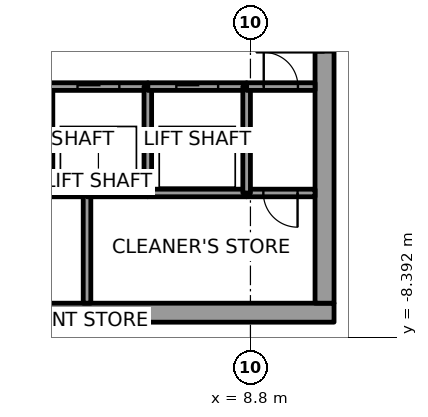
"""IFC4 building model, lengths in metres.
Left out: names, types, materials, properties, quantities, classifications, styles, units other than length and angle.
Written with IfcOpenShell. Run it as: python <this file> out.ifc"""

import sys

from ifc_helpers import new_model, si_unit, direction, frame, frame_2d, origin, place, context, subcontext, project, spatial, rectangle, extrude, element, fill, save


model = new_model("IFC4")
c1 = context("Model", 3, precision=1e-05, world=origin(), true_north=direction((0.0, 1.0)))
c2 = subcontext(c1, "Body", "Model", "MODEL_VIEW")
j1 = project(units=[si_unit("LENGTHUNIT", "METRE"), si_unit("PLANEANGLEUNIT", "RADIAN")], contexts=[c1])
p1 = place(None, origin())
s1 = spatial("IfcSite", under=j1, at=p1, CompositionType="ELEMENT")
p2 = place(p1, origin())
s2 = spatial("IfcBuilding", under=s1, at=p2, CompositionType="ELEMENT")
p3 = place(p2, frame((0.0, 0.0, 145.8)))
s3 = spatial("IfcBuildingStorey", under=s2, at=p3, CompositionType="ELEMENT", Elevation=145.8)
p4 = place(p3, frame((-11.0, -7.75, 0.0), z_axis=(0.0, 0.0, 1.0), x_axis=(1.0, 0.0, 0.0)))
e1 = element("IfcWall", 1, at=p4, inside=s3, PredefinedType="SHEAR", context=c2, shape_type="SweptSolid", body=[
    extrude(rectangle(XDim=22.0, YDim=0.5, at=frame_2d((11.0, 0.0))), origin(), (0.0, 0.0, 1.0), 4.0),
])
p5 = place(p4, frame((10.45, 0.0, 0.0)))
e2 = element("IfcOpeningElement", 2, at=p5, cuts=e1, PredefinedType="OPENING", context=c2, shape_type="SweptSolid", body=[
    extrude(rectangle(XDim=1.1, YDim=2.1, at=frame_2d((0.55, 1.05))), frame((0.0, 0.25, 0.0), z_axis=(0.0, -1.0, 0.0), x_axis=(1.0, 0.0, 0.0)), (0.0, 0.0, 1.0), 0.5),
])
p6 = place(p3, frame((10.75, -7.5, 0.0), z_axis=(0.0, 0.0, 1.0), x_axis=(0.0, 1.0, 0.0)))
e3 = element("IfcWall", 3, at=p6, inside=s3, PredefinedType="SHEAR", context=c2, shape_type="SweptSolid", body=[
    extrude(rectangle(XDim=15.0, YDim=0.5, at=frame_2d((7.5, 0.0))), origin(), (0.0, 0.0, 1.0), 4.0),
])
p7 = place(p6, frame((6.6, 0.0, 0.0)))
e4 = element("IfcOpeningElement", 4, at=p7, cuts=e3, PredefinedType="OPENING", context=c2, shape_type="SweptSolid", body=[
    extrude(rectangle(XDim=1.8, YDim=2.1, at=frame_2d((0.9, 1.05))), frame((0.0, 0.25, 0.0), z_axis=(0.0, -1.0, 0.0), x_axis=(1.0, 0.0, 0.0)), (0.0, 0.0, 1.0), 0.5),
])
p8 = place(p3, frame((4.5, -4.6, 0.0), z_axis=(0.0, 0.0, 1.0), x_axis=(-1.0, 0.0, 0.0)))
e5 = element("IfcWall", 5, at=p8, inside=s3, PredefinedType="SOLIDWALL", context=c2, shape_type="SweptSolid", body=[
    extrude(rectangle(XDim=1.0, YDim=0.2, at=frame_2d((0.5, 0.0))), origin(), (0.0, 0.0, 1.0), 3.85),
])
p9 = place(p3, frame((3.5, -1.8, 0.0), z_axis=(0.0, 0.0, 1.0), x_axis=(1.0, 0.0, 0.0)))
e6 = element("IfcWall", 6, at=p9, inside=s3, PredefinedType="SOLIDWALL", context=c2, shape_type="SweptSolid", body=[
    extrude(rectangle(XDim=2.6, YDim=0.2, at=frame_2d((1.3, 0.0))), origin(), (0.0, 0.0, 1.0), 3.85),
])
p10 = place(p9, frame((0.75, 0.0, 0.0)))
e7 = element("IfcOpeningElement", 7, at=p10, cuts=e6, PredefinedType="OPENING", context=c2, shape_type="SweptSolid", body=[
    extrude(rectangle(XDim=1.1, YDim=2.1, at=frame_2d((0.55, 1.05))), frame((0.0, 0.1, 0.0), z_axis=(0.0, -1.0, 0.0), x_axis=(1.0, 0.0, 0.0)), (0.0, 0.0, 1.0), 0.2),
])
p11 = place(p3, frame((4.5, -4.6, 0.0), z_axis=(0.0, 0.0, 1.0), x_axis=(0.0, -1.0, 0.0)))
e8 = element("IfcWall", 8, at=p11, inside=s3, PredefinedType="SOLIDWALL", context=c2, shape_type="SweptSolid", body=[
    extrude(rectangle(XDim=2.9, YDim=0.2, at=frame_2d((1.45, 0.0))), origin(), (0.0, 0.0, 1.0), 3.85),
])
p12 = place(p3, frame((6.1, -4.6, 0.0), z_axis=(0.0, 0.0, 1.0), x_axis=(-1.0, 0.0, 0.0)))
e9 = element("IfcWall", 9, at=p12, inside=s3, PredefinedType="SOLIDWALL", context=c2, shape_type="SweptSolid", body=[
    extrude(rectangle(XDim=1.6, YDim=0.2, at=frame_2d((0.8, 0.0))), origin(), (0.0, 0.0, 1.0), 3.85),
])
p13 = place(p3, frame((8.7, -4.6, 0.0), z_axis=(0.0, 0.0, 1.0), x_axis=(-1.0, 0.0, 0.0)))
e10 = element("IfcWall", 10, at=p13, inside=s3, PredefinedType="SOLIDWALL", context=c2, shape_type="SweptSolid", body=[
    extrude(rectangle(XDim=2.6, YDim=0.2, at=frame_2d((1.3, 0.0))), origin(), (0.0, 0.0, 1.0), 3.85),
])
p14 = place(p3, frame((6.1, -4.6, 0.0), z_axis=(0.0, 0.0, 1.0), x_axis=(0.0, 1.0, 0.0)))
e11 = element("IfcWall", 11, at=p14, inside=s3, PredefinedType="SOLIDWALL", context=c2, shape_type="SweptSolid", body=[
    extrude(rectangle(XDim=2.8, YDim=0.2, at=frame_2d((1.4, 0.0))), origin(), (0.0, 0.0, 1.0), 3.85),
])
p15 = place(p3, frame((6.1, -1.8, 0.0), z_axis=(0.0, 0.0, 1.0), x_axis=(1.0, 0.0, 0.0)))
e12 = element("IfcWall", 12, at=p15, inside=s3, PredefinedType="SOLIDWALL", context=c2, shape_type="SweptSolid", body=[
    extrude(rectangle(XDim=2.6, YDim=0.2, at=frame_2d((1.3, 0.0))), origin(), (0.0, 0.0, 1.0), 3.85),
])
p16 = place(p15, frame((0.75, 0.0, 0.0)))
e13 = element("IfcOpeningElement", 13, at=p16, cuts=e12, PredefinedType="OPENING", context=c2, shape_type="SweptSolid", body=[
    extrude(rectangle(XDim=1.1, YDim=2.1, at=frame_2d((0.55, 1.05))), frame((0.0, 0.1, 0.0), z_axis=(0.0, -1.0, 0.0), x_axis=(1.0, 0.0, 0.0)), (0.0, 0.0, 1.0), 0.2),
])
p17 = place(p3, frame((10.5, -4.6, 0.0), z_axis=(0.0, 0.0, 1.0), x_axis=(-1.0, 0.0, 0.0)))
e14 = element("IfcWall", 14, at=p17, inside=s3, PredefinedType="SOLIDWALL", context=c2, shape_type="SweptSolid", body=[
    extrude(rectangle(XDim=1.8, YDim=0.2, at=frame_2d((0.9, 0.0))), origin(), (0.0, 0.0, 1.0), 3.85),
])
p18 = place(p17, frame((0.46, 0.0, 0.0)))
e15 = element("IfcOpeningElement", 15, at=p18, cuts=e14, PredefinedType="OPENING", context=c2, shape_type="SweptSolid", body=[
    extrude(rectangle(XDim=0.9, YDim=2.1, at=frame_2d((0.45, 1.05))), frame((0.0, 0.1, 0.0), z_axis=(0.0, -1.0, 0.0), x_axis=(1.0, 0.0, 0.0)), (0.0, 0.0, 1.0), 0.2),
])
p19 = place(p3, frame((8.7, -1.8, 0.0), z_axis=(0.0, 0.0, 1.0), x_axis=(0.0, -1.0, 0.0)))
e16 = element("IfcWall", 16, at=p19, inside=s3, PredefinedType="SOLIDWALL", context=c2, shape_type="SweptSolid", body=[
    extrude(rectangle(XDim=2.8, YDim=0.2, at=frame_2d((1.4, 0.0))), origin(), (0.0, 0.0, 1.0), 3.85),
])
p20 = place(p3, frame((8.7, -1.8, 0.0), z_axis=(0.0, 0.0, 1.0), x_axis=(1.0, 0.0, 0.0)))
e17 = element("IfcWall", 17, at=p20, inside=s3, PredefinedType="SOLIDWALL", context=c2, shape_type="SweptSolid", body=[
    extrude(rectangle(XDim=1.8, YDim=0.2, at=frame_2d((0.9, 0.0))), origin(), (0.0, 0.0, 1.0), 3.85),
])
p21 = place(p20, frame((0.45, 0.0, 0.0)))
e18 = element("IfcOpeningElement", 18, at=p21, cuts=e17, PredefinedType="OPENING", context=c2, shape_type="SweptSolid", body=[
    extrude(rectangle(XDim=0.9, YDim=2.1, at=frame_2d((0.45, 1.05))), frame((0.0, 0.1, 0.0), z_axis=(0.0, -1.0, 0.0), x_axis=(1.0, 0.0, 0.0)), (0.0, 0.0, 1.0), 0.2),
])
p22 = place(p10, origin())
e19 = element("IfcDoor", 19, at=p22, inside=s3, OperationType="SLIDING_TO_RIGHT", PredefinedType="DOOR", context=c2, shape_type="SweptSolid", body=[
    extrude(rectangle(XDim=1.1, YDim=2.1, at=frame_2d((0.55, 1.05))), frame((0.0, 0.025, 0.0), z_axis=(0.0, -1.0, 0.0), x_axis=(1.0, 0.0, 0.0)), (0.0, 0.0, 1.0), 0.05),
])
fill(e7, e19)
p23 = place(p16, origin())
e20 = element("IfcDoor", 20, at=p23, inside=s3, OperationType="SLIDING_TO_RIGHT", PredefinedType="DOOR", context=c2, shape_type="SweptSolid", body=[
    extrude(rectangle(XDim=1.1, YDim=2.1, at=frame_2d((0.55, 1.05))), frame((0.0, 0.025, 0.0), z_axis=(0.0, -1.0, 0.0), x_axis=(1.0, 0.0, 0.0)), (0.0, 0.0, 1.0), 0.05),
])
fill(e13, e20)
p24 = place(p18, origin())
e21 = element("IfcDoor", 21, at=p24, inside=s3, OperationType="SINGLE_SWING_LEFT", PredefinedType="DOOR", context=c2, shape_type="SweptSolid", body=[
    extrude(rectangle(XDim=0.9, YDim=2.1, at=frame_2d((0.45, 1.05))), frame((0.0, 0.025, 0.0), z_axis=(0.0, -1.0, 0.0), x_axis=(1.0, 0.0, 0.0)), (0.0, 0.0, 1.0), 0.05),
])
fill(e15, e21)
p25 = place(p21, origin())
e22 = element("IfcDoor", 22, at=p25, inside=s3, OperationType="SINGLE_SWING_RIGHT", PredefinedType="DOOR", context=c2, shape_type="SweptSolid", body=[
    extrude(rectangle(XDim=0.9, YDim=2.1, at=frame_2d((0.45, 1.05))), frame((0.0, 0.025, 0.0), z_axis=(0.0, -1.0, 0.0), x_axis=(1.0, 0.0, 0.0)), (0.0, 0.0, 1.0), 0.05),
])
fill(e18, e22)
p26 = place(p7, origin())
e23 = element("IfcDoor", 23, at=p26, inside=s3, OperationType="DOUBLE_DOOR_SINGLE_SWING", PredefinedType="DOOR", context=c2, shape_type="SweptSolid", body=[
    extrude(rectangle(XDim=1.8, YDim=2.1, at=frame_2d((0.9, 1.05))), frame((0.0, 0.025, 0.0), z_axis=(0.0, -1.0, 0.0), x_axis=(1.0, 0.0, 0.0)), (0.0, 0.0, 1.0), 0.05),
])
fill(e4, e23)
save(model, sys.argv[1])
